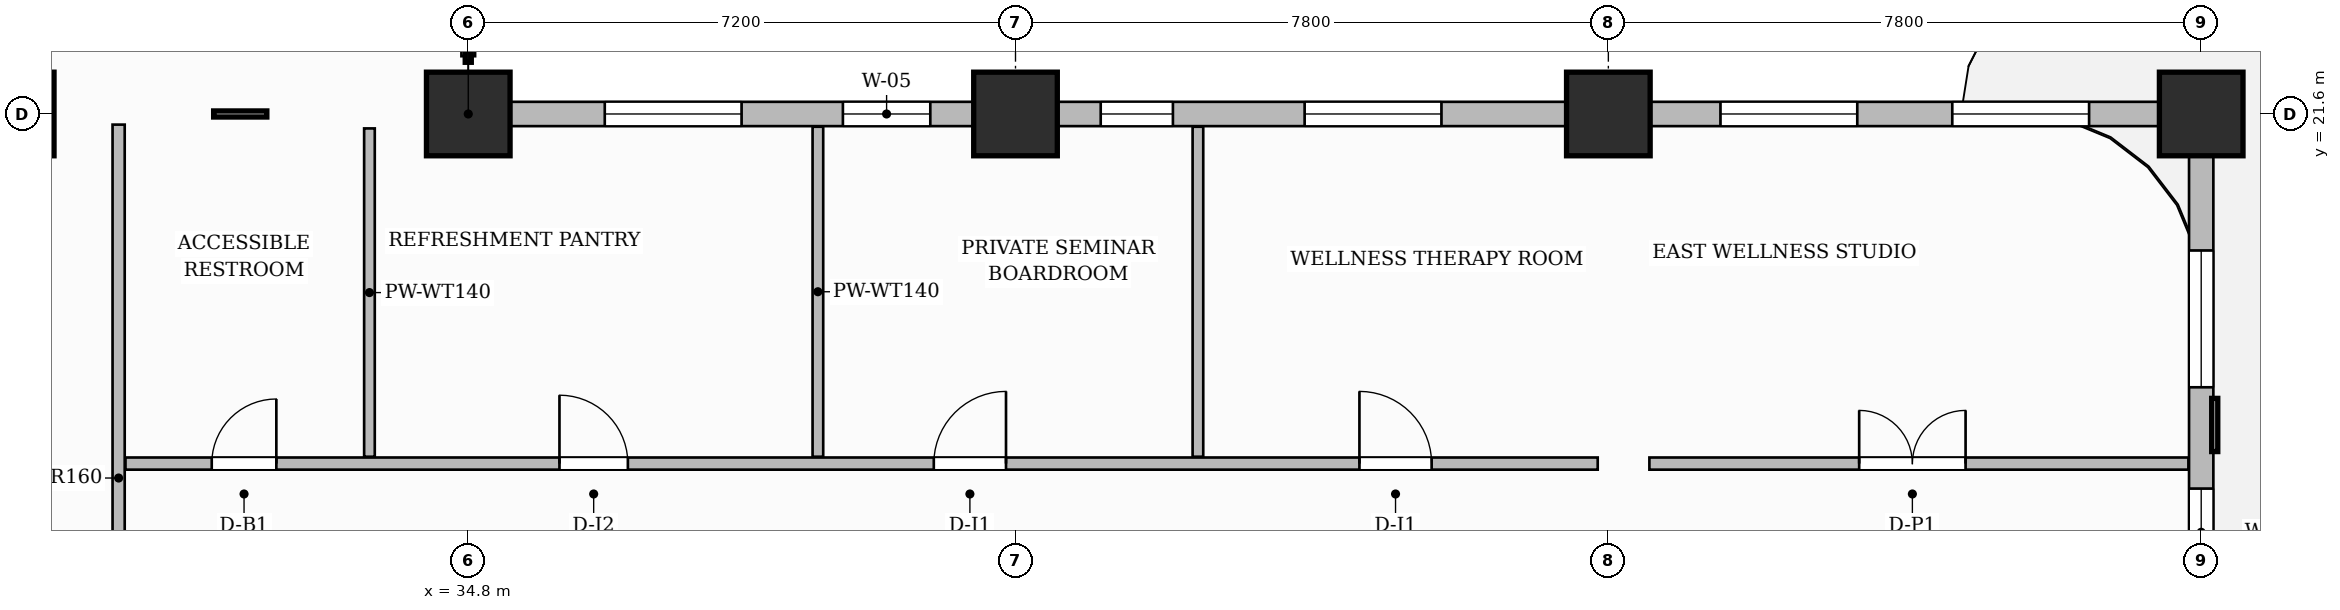
"""IFC4 building model, lengths in metres.
Left out: names, types, materials, properties, quantities, classifications, styles, units other than length and angle.
Written with IfcOpenShell. Run it as: python <this file> out.ifc"""

import sys

from ifc_helpers import new_model, si_unit, direction, frame, frame_2d, origin, origin_2d, place, context, subcontext, project, spatial, rectangle, extrude, source, transform, mapped, element, fill, save


model = new_model("IFC4")
c1 = context("Model", 3, precision=1e-05, world=origin(), true_north=direction((0.0, 1.0)))
c2 = subcontext(c1, "Body", "Model", "MODEL_VIEW")
j1 = project(units=[si_unit("LENGTHUNIT", "METRE"), si_unit("PLANEANGLEUNIT", "RADIAN")], contexts=[c1])
p1 = place(None, origin())
s1 = spatial("IfcSite", under=j1, at=p1, CompositionType="ELEMENT")
p2 = place(p1, origin())
s2 = spatial("IfcBuilding", under=s1, at=p2, CompositionType="ELEMENT")
p3 = place(p2, frame((0.0, 0.0, 69.4)))
s3 = spatial("IfcBuildingStorey", under=s2, at=p3, CompositionType="ELEMENT", Elevation=69.4)
m1 = source(origin(), c2, "Body", "SweptSolid", [
    extrude(rectangle(XDim=1.1, YDim=1.1, at=origin_2d()), origin(), (0.0, 0.0, 1.0), 3.7),
])
for number, where, z_axis, x_axis in (
    (1, (28.8, 21.6, 0.0), (0.0, 0.0, 1.0), (1.0, 0.0, 0.0)),
    (2, (34.8, 21.6, 0.0), (0.0, 0.0, 1.0), (1.0, 0.0, 0.0)),
    (3, (42.0, 21.6, 0.0), (0.0, 0.0, 1.0), (1.0, 0.0, 0.0)),
    (4, (49.8, 21.6, 0.0), (0.0, 0.0, 1.0), (1.0, 0.0, 0.0)),
    (5, (57.6, 21.6, 0.0), (0.0, 0.0, 1.0), (1.0, 0.0, 0.0)),
):
    element("IfcColumn", number, at=place(p3, frame(where, z_axis=z_axis, x_axis=x_axis)), inside=s3, PredefinedType="COLUMN", context=c2, shape_type="MappedRepresentation", body=[
        mapped(m1, transform((0.0, 0.0, 0.0), scale=1.0)),
    ])
p4 = place(p3, frame((30.2, 12.16, 0.0), z_axis=(0.0, 0.0, 1.0), x_axis=(0.0, 1.0, 0.0)))
e6 = element("IfcWall", 6, at=p4, inside=s3, PredefinedType="PARTITIONING", context=c2, shape_type="SweptSolid", body=[
    extrude(rectangle(XDim=9.3, YDim=0.16, at=frame_2d((4.65, 0.0))), origin(), (0.0, 0.0, 1.0), 3.45),
])
p5 = place(p3, frame((30.29, 17.0, 0.0), z_axis=(0.0, 0.0, 1.0), x_axis=(1.0, 0.0, 0.0)))
e7 = element("IfcWall", 7, at=p5, inside=s3, PredefinedType="PARTITIONING", context=c2, shape_type="SweptSolid", body=[
    extrude(rectangle(XDim=19.37, YDim=0.16, at=frame_2d((9.685, 0.0))), origin(), (0.0, 0.0, 1.0), 3.45),
])
p6 = place(p5, frame((1.135, 0.0, 0.0)))
e8 = element("IfcOpeningElement", 8, at=p6, cuts=e7, PredefinedType="OPENING", context=c2, shape_type="SweptSolid", body=[
    extrude(rectangle(XDim=0.85, YDim=2.1, at=frame_2d((0.425, 1.05))), frame((0.0, 0.09, 0.0), z_axis=(0.0, -1.0, 0.0), x_axis=(1.0, 0.0, 0.0)), (0.0, 0.0, 1.0), 0.18),
])
p7 = place(p5, frame((5.71, 0.0, 0.0)))
e9 = element("IfcOpeningElement", 9, at=p7, cuts=e7, PredefinedType="OPENING", context=c2, shape_type="SweptSolid", body=[
    extrude(rectangle(XDim=0.9, YDim=2.15, at=frame_2d((0.45, 1.075))), frame((0.0, 0.09, 0.0), z_axis=(0.0, -1.0, 0.0), x_axis=(1.0, 0.0, 0.0)), (0.0, 0.0, 1.0), 0.18),
])
p8 = place(p5, frame((10.635, 0.0, 0.0)))
e10 = element("IfcOpeningElement", 10, at=p8, cuts=e7, PredefinedType="OPENING", context=c2, shape_type="SweptSolid", body=[
    extrude(rectangle(XDim=0.95, YDim=2.15, at=frame_2d((0.475, 1.075))), frame((0.0, 0.09, 0.0), z_axis=(0.0, -1.0, 0.0), x_axis=(1.0, 0.0, 0.0)), (0.0, 0.0, 1.0), 0.18),
])
p9 = place(p5, frame((16.235, 0.0, 0.0)))
e11 = element("IfcOpeningElement", 11, at=p9, cuts=e7, PredefinedType="OPENING", context=c2, shape_type="SweptSolid", body=[
    extrude(rectangle(XDim=0.95, YDim=2.15, at=frame_2d((0.475, 1.075))), frame((0.0, 0.09, 0.0), z_axis=(0.0, -1.0, 0.0), x_axis=(1.0, 0.0, 0.0)), (0.0, 0.0, 1.0), 0.18),
])
p10 = place(p3, frame((50.34, 17.0, 0.0), z_axis=(0.0, 0.0, 1.0), x_axis=(1.0, 0.0, 0.0)))
e12 = element("IfcWall", 12, at=p10, inside=s3, PredefinedType="PARTITIONING", context=c2, shape_type="SweptSolid", body=[
    extrude(rectangle(XDim=7.092, YDim=0.16, at=frame_2d((3.546, 0.0))), origin(), (0.0, 0.0, 1.0), 3.45),
])
p11 = place(p10, frame((2.76, 0.0, 0.0)))
e13 = element("IfcOpeningElement", 13, at=p11, cuts=e12, PredefinedType="OPENING", context=c2, shape_type="SweptSolid", body=[
    extrude(rectangle(XDim=1.4, YDim=2.35, at=frame_2d((0.7, 1.175))), frame((0.0, 0.09, 0.0), z_axis=(0.0, -1.0, 0.0), x_axis=(1.0, 0.0, 0.0)), (0.0, 0.0, 1.0), 0.18),
])
p12 = place(p3, frame((33.5, 17.09, 0.0), z_axis=(0.0, 0.0, 1.0), x_axis=(0.0, 1.0, 0.0)))
e14 = element("IfcWall", 14, at=p12, inside=s3, PredefinedType="PARTITIONING", context=c2, shape_type="SweptSolid", body=[
    extrude(rectangle(XDim=4.32, YDim=0.14, at=frame_2d((2.16, 0.0))), origin(), (0.0, 0.0, 1.0), 3.45),
])
for number, where, z_axis, x_axis in (
    (15, (39.4, 17.09, 0.0), (0.0, 0.0, 1.0), (0.0, 1.0, 0.0)),
    (16, (44.4, 17.09, 0.0), (0.0, 0.0, 1.0), (0.0, 1.0, 0.0)),
):
    element("IfcWall", number, at=place(p3, frame(where, z_axis=z_axis, x_axis=x_axis)), inside=s3, PredefinedType="PARTITIONING", context=c2, shape_type="SweptSolid", body=[
        extrude(rectangle(XDim=4.342, YDim=0.14, at=frame_2d((2.171, 0.0))), origin(), (0.0, 0.0, 1.0), 3.45),
    ])
p13 = place(p3, frame((57.6, 0.05, 0.0), z_axis=(0.0, 0.0, 1.0), x_axis=(0.0, 1.0, 0.0)))
e17 = element("IfcWall", 17, at=p13, inside=s3, PredefinedType="SOLIDWALL", context=c2, shape_type="SweptSolid", body=[
    extrude(rectangle(XDim=21.5, YDim=0.32, at=frame_2d((10.75, 0.0))), origin(), (0.0, 0.0, 1.0), 2.885),
])
p14 = place(p13, frame((3.4, 0.0, 0.0)))
e18 = element("IfcOpeningElement", 18, at=p14, cuts=e17, PredefinedType="OPENING", context=c2, shape_type="SweptSolid", body=[
    extrude(rectangle(XDim=1.2, YDim=2.2, at=frame_2d((0.6, 1.1))), frame((0.0, 0.17, 0.0), z_axis=(0.0, -1.0, 0.0), x_axis=(1.0, 0.0, 0.0)), (0.0, 0.0, 1.0), 0.34),
])
p15 = place(p13, frame((1.225, 0.0, 0.8)))
e19 = element("IfcOpeningElement", 19, at=p15, cuts=e17, PredefinedType="OPENING", context=c2, shape_type="SweptSolid", body=[
    extrude(rectangle(XDim=1.4, YDim=1.85, at=frame_2d((0.7, 0.925))), frame((0.0, 0.17, 0.0), z_axis=(0.0, -1.0, 0.0), x_axis=(1.0, 0.0, 0.0)), (0.0, 0.0, 1.0), 0.34),
])
p16 = place(p13, frame((5.15, 0.0, 0.8)))
e20 = element("IfcOpeningElement", 20, at=p16, cuts=e17, PredefinedType="OPENING", context=c2, shape_type="SweptSolid", body=[
    extrude(rectangle(XDim=0.95, YDim=1.75, at=frame_2d((0.475, 0.875))), frame((0.0, 0.17, 0.0), z_axis=(0.0, -1.0, 0.0), x_axis=(1.0, 0.0, 0.0)), (0.0, 0.0, 1.0), 0.34),
])
p17 = place(p13, frame((8.475, 0.0, 0.8)))
e21 = element("IfcOpeningElement", 21, at=p17, cuts=e17, PredefinedType="OPENING", context=c2, shape_type="SweptSolid", body=[
    extrude(rectangle(XDim=1.8, YDim=1.85, at=frame_2d((0.9, 0.925))), frame((0.0, 0.17, 0.0), z_axis=(0.0, -1.0, 0.0), x_axis=(1.0, 0.0, 0.0)), (0.0, 0.0, 1.0), 0.34),
])
p18 = place(p13, frame((11.225, 0.0, 0.8)))
e22 = element("IfcOpeningElement", 22, at=p18, cuts=e17, PredefinedType="OPENING", context=c2, shape_type="SweptSolid", body=[
    extrude(rectangle(XDim=1.8, YDim=1.85, at=frame_2d((0.9, 0.925))), frame((0.0, 0.17, 0.0), z_axis=(0.0, -1.0, 0.0), x_axis=(1.0, 0.0, 0.0)), (0.0, 0.0, 1.0), 0.34),
])
p19 = place(p13, frame((15.471, 0.0, 0.8)))
e23 = element("IfcOpeningElement", 23, at=p19, cuts=e17, PredefinedType="OPENING", context=c2, shape_type="SweptSolid", body=[
    extrude(rectangle(XDim=1.15, YDim=1.8, at=frame_2d((0.575, 0.9))), frame((0.0, 0.17, 0.0), z_axis=(0.0, -1.0, 0.0), x_axis=(1.0, 0.0, 0.0)), (0.0, 0.0, 1.0), 0.34),
])
p20 = place(p13, frame((17.954, 0.0, 0.8)))
e24 = element("IfcOpeningElement", 24, at=p20, cuts=e17, PredefinedType="OPENING", context=c2, shape_type="SweptSolid", body=[
    extrude(rectangle(XDim=1.8, YDim=1.85, at=frame_2d((0.9, 0.925))), frame((0.0, 0.17, 0.0), z_axis=(0.0, -1.0, 0.0), x_axis=(1.0, 0.0, 0.0)), (0.0, 0.0, 1.0), 0.34),
])
p21 = place(p3, frame((34.8, 21.6, 0.0), z_axis=(0.0, 0.0, 1.0), x_axis=(1.0, 0.0, 0.0)))
e25 = element("IfcWall", 25, at=p21, inside=s3, PredefinedType="SOLIDWALL", context=c2, shape_type="SweptSolid", body=[
    extrude(rectangle(XDim=22.8, YDim=0.32, at=frame_2d((11.4, 0.0))), origin(), (0.0, 0.0, 1.0), 2.885),
])
p22 = place(p21, frame((1.796, 0.0, 0.8)))
e26 = element("IfcOpeningElement", 26, at=p22, cuts=e25, PredefinedType="OPENING", context=c2, shape_type="SweptSolid", body=[
    extrude(rectangle(XDim=1.8, YDim=1.85, at=frame_2d((0.9, 0.925))), frame((0.0, 0.17, 0.0), z_axis=(0.0, -1.0, 0.0), x_axis=(1.0, 0.0, 0.0)), (0.0, 0.0, 1.0), 0.34),
])
p23 = place(p21, frame((4.929, 0.0, 0.8)))
e27 = element("IfcOpeningElement", 27, at=p23, cuts=e25, PredefinedType="OPENING", context=c2, shape_type="SweptSolid", body=[
    extrude(rectangle(XDim=1.15, YDim=1.8, at=frame_2d((0.575, 0.9))), frame((0.0, 0.17, 0.0), z_axis=(0.0, -1.0, 0.0), x_axis=(1.0, 0.0, 0.0)), (0.0, 0.0, 1.0), 0.34),
])
p24 = place(p21, frame((8.321, 0.0, 0.8)))
e28 = element("IfcOpeningElement", 28, at=p24, cuts=e25, PredefinedType="OPENING", context=c2, shape_type="SweptSolid", body=[
    extrude(rectangle(XDim=0.95, YDim=1.75, at=frame_2d((0.475, 0.875))), frame((0.0, 0.17, 0.0), z_axis=(0.0, -1.0, 0.0), x_axis=(1.0, 0.0, 0.0)), (0.0, 0.0, 1.0), 0.34),
])
p25 = place(p21, frame((11.004, 0.0, 0.8)))
e29 = element("IfcOpeningElement", 29, at=p25, cuts=e25, PredefinedType="OPENING", context=c2, shape_type="SweptSolid", body=[
    extrude(rectangle(XDim=1.8, YDim=1.85, at=frame_2d((0.9, 0.925))), frame((0.0, 0.17, 0.0), z_axis=(0.0, -1.0, 0.0), x_axis=(1.0, 0.0, 0.0)), (0.0, 0.0, 1.0), 0.34),
])
p26 = place(p21, frame((16.475, 0.0, 0.8)))
e30 = element("IfcOpeningElement", 30, at=p26, cuts=e25, PredefinedType="OPENING", context=c2, shape_type="SweptSolid", body=[
    extrude(rectangle(XDim=1.8, YDim=1.85, at=frame_2d((0.9, 0.925))), frame((0.0, 0.17, 0.0), z_axis=(0.0, -1.0, 0.0), x_axis=(1.0, 0.0, 0.0)), (0.0, 0.0, 1.0), 0.34),
])
p27 = place(p21, frame((19.525, 0.0, 0.8)))
e31 = element("IfcOpeningElement", 31, at=p27, cuts=e25, PredefinedType="OPENING", context=c2, shape_type="SweptSolid", body=[
    extrude(rectangle(XDim=1.8, YDim=1.85, at=frame_2d((0.9, 0.925))), frame((0.0, 0.17, 0.0), z_axis=(0.0, -1.0, 0.0), x_axis=(1.0, 0.0, 0.0)), (0.0, 0.0, 1.0), 0.34),
])
m2 = source(origin(), c2, "Body", "SweptSolid", [
    extrude(rectangle(XDim=1.4, YDim=2.35, at=frame_2d((0.7, 1.175))), frame((0.0, 0.025, 0.0), z_axis=(0.0, -1.0, 0.0), x_axis=(1.0, 0.0, 0.0)), (0.0, 0.0, 1.0), 0.05),
])
p28 = place(p11, origin())
e32 = element("IfcDoor", 32, at=p28, inside=s3, OperationType="DOUBLE_DOOR_SINGLE_SWING", PredefinedType="DOOR", context=c2, shape_type="MappedRepresentation", body=[
    mapped(m2, transform((0.0, 0.0, 0.0), scale=1.0)),
])
fill(e13, e32)
m3 = source(origin(), c2, "Body", "SweptSolid", [
    extrude(rectangle(XDim=0.85, YDim=2.1, at=frame_2d((0.425, 1.05))), frame((0.0, 0.025, 0.0), z_axis=(0.0, -1.0, 0.0), x_axis=(1.0, 0.0, 0.0)), (0.0, 0.0, 1.0), 0.05),
])
p29 = place(p6, origin())
e33 = element("IfcDoor", 33, at=p29, inside=s3, OperationType="SINGLE_SWING_RIGHT", PredefinedType="DOOR", context=c2, shape_type="MappedRepresentation", body=[
    mapped(m3, transform((0.0, 0.0, 0.0), scale=1.0)),
])
fill(e8, e33)
m4 = source(origin(), c2, "Body", "SweptSolid", [
    extrude(rectangle(XDim=0.9, YDim=2.15, at=frame_2d((0.45, 1.075))), frame((0.0, 0.025, 0.0), z_axis=(0.0, -1.0, 0.0), x_axis=(1.0, 0.0, 0.0)), (0.0, 0.0, 1.0), 0.05),
])
p30 = place(p7, origin())
e34 = element("IfcDoor", 34, at=p30, inside=s3, OperationType="SINGLE_SWING_LEFT", PredefinedType="DOOR", context=c2, shape_type="MappedRepresentation", body=[
    mapped(m4, transform((0.0, 0.0, 0.0), scale=1.0)),
])
fill(e9, e34)
m5 = source(origin(), c2, "Body", "SweptSolid", [
    extrude(rectangle(XDim=0.95, YDim=2.15, at=frame_2d((0.475, 1.075))), frame((0.0, 0.025, 0.0), z_axis=(0.0, -1.0, 0.0), x_axis=(1.0, 0.0, 0.0)), (0.0, 0.0, 1.0), 0.05),
])
p31 = place(p8, origin())
e35 = element("IfcDoor", 35, at=p31, inside=s3, OperationType="SINGLE_SWING_RIGHT", PredefinedType="DOOR", context=c2, shape_type="MappedRepresentation", body=[
    mapped(m5, transform((0.0, 0.0, 0.0), scale=1.0)),
])
fill(e10, e35)
p32 = place(p9, origin())
e36 = element("IfcDoor", 36, at=p32, inside=s3, OperationType="SINGLE_SWING_LEFT", PredefinedType="DOOR", context=c2, shape_type="MappedRepresentation", body=[
    mapped(m5, transform((0.0, 0.0, 0.0), scale=1.0)),
])
fill(e11, e36)
m6 = source(origin(), c2, "Body", "SweptSolid", [
    extrude(rectangle(XDim=1.15, YDim=1.8, at=frame_2d((0.575, 0.9))), frame((0.0, 0.03, 0.0), z_axis=(0.0, -1.0, 0.0), x_axis=(1.0, 0.0, 0.0)), (0.0, 0.0, 1.0), 0.06),
])
p33 = place(p19, origin())
e37 = element("IfcWindow", 37, at=p33, inside=s3, PartitioningType="SINGLE_PANEL", PredefinedType="WINDOW", context=c2, shape_type="MappedRepresentation", body=[
    mapped(m6, transform((0.0, 0.0, 0.0), scale=1.0)),
])
fill(e23, e37)
m7 = source(origin(), c2, "Body", "SweptSolid", [
    extrude(rectangle(XDim=1.8, YDim=1.85, at=frame_2d((0.9, 0.925))), frame((0.0, 0.03, 0.0), z_axis=(0.0, -1.0, 0.0), x_axis=(1.0, 0.0, 0.0)), (0.0, 0.0, 1.0), 0.06),
])
p34 = place(p20, origin())
e38 = element("IfcWindow", 38, at=p34, inside=s3, PartitioningType="DOUBLE_PANEL_VERTICAL", PredefinedType="WINDOW", context=c2, shape_type="MappedRepresentation", body=[
    mapped(m7, transform((0.0, 0.0, 0.0), scale=1.0)),
])
fill(e24, e38)
p35 = place(p22, origin())
e39 = element("IfcWindow", 39, at=p35, inside=s3, PartitioningType="DOUBLE_PANEL_VERTICAL", PredefinedType="WINDOW", context=c2, shape_type="MappedRepresentation", body=[
    mapped(m7, transform((0.0, 0.0, 0.0), scale=1.0)),
])
fill(e26, e39)
p36 = place(p23, origin())
e40 = element("IfcWindow", 40, at=p36, inside=s3, PartitioningType="SINGLE_PANEL", PredefinedType="WINDOW", context=c2, shape_type="MappedRepresentation", body=[
    mapped(m6, transform((0.0, 0.0, 0.0), scale=1.0)),
])
fill(e27, e40)
m8 = source(origin(), c2, "Body", "SweptSolid", [
    extrude(rectangle(XDim=0.95, YDim=1.75, at=frame_2d((0.475, 0.875))), frame((0.0, 0.03, 0.0), z_axis=(0.0, -1.0, 0.0), x_axis=(1.0, 0.0, 0.0)), (0.0, 0.0, 1.0), 0.06),
])
p37 = place(p24, origin())
e41 = element("IfcWindow", 41, at=p37, inside=s3, PartitioningType="SINGLE_PANEL", PredefinedType="WINDOW", context=c2, shape_type="MappedRepresentation", body=[
    mapped(m8, transform((0.0, 0.0, 0.0), scale=1.0)),
])
fill(e28, e41)
p38 = place(p25, origin())
e42 = element("IfcWindow", 42, at=p38, inside=s3, PartitioningType="DOUBLE_PANEL_VERTICAL", PredefinedType="WINDOW", context=c2, shape_type="MappedRepresentation", body=[
    mapped(m7, transform((0.0, 0.0, 0.0), scale=1.0)),
])
fill(e29, e42)
p39 = place(p26, origin())
e43 = element("IfcWindow", 43, at=p39, inside=s3, PartitioningType="DOUBLE_PANEL_VERTICAL", PredefinedType="WINDOW", context=c2, shape_type="MappedRepresentation", body=[
    mapped(m7, transform((0.0, 0.0, 0.0), scale=1.0)),
])
fill(e30, e43)
p40 = place(p27, origin())
e44 = element("IfcWindow", 44, at=p40, inside=s3, PartitioningType="DOUBLE_PANEL_VERTICAL", PredefinedType="WINDOW", context=c2, shape_type="MappedRepresentation", body=[
    mapped(m7, transform((0.0, 0.0, 0.0), scale=1.0)),
])
fill(e31, e44)
save(model, sys.argv[1])
